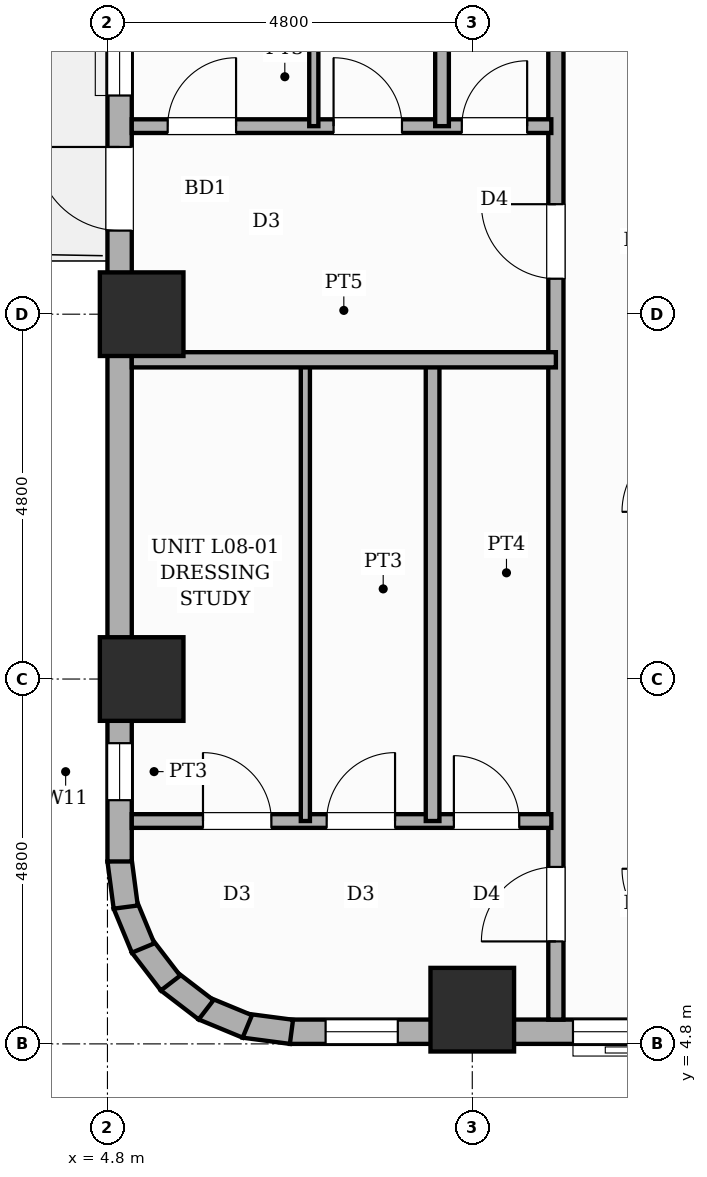
"""IFC4 building model, lengths in metres.
Left out: names, types, materials, properties, quantities, classifications, styles, units other than length and angle.
Written with IfcOpenShell. Run it as: python <this file> out.ifc"""

import sys

from ifc_helpers import new_model, si_unit, direction, frame, frame_2d, origin, origin_2d, place, context, subcontext, project, spatial, rectangle, extrude, element, fill, save


model = new_model("IFC4")
c1 = context("Model", 3, precision=1e-05, world=origin(), true_north=direction((0.0, 1.0)))
c2 = subcontext(c1, "Body", "Model", "MODEL_VIEW")
j1 = project(units=[si_unit("LENGTHUNIT", "METRE"), si_unit("PLANEANGLEUNIT", "RADIAN")], contexts=[c1])
p1 = place(None, origin())
s1 = spatial("IfcSite", under=j1, at=p1, CompositionType="ELEMENT")
p2 = place(p1, origin())
s2 = spatial("IfcBuilding", under=s1, at=p2, CompositionType="ELEMENT")
p3 = place(p2, frame((0.0, 0.0, 35.8)))
s3 = spatial("IfcBuildingStorey", under=s2, at=p3, CompositionType="ELEMENT", Elevation=35.8)
for number, where, z_axis, x_axis in (
    (1, (5.25, 9.6, 0.0), (0.0, 0.0, 1.0), (1.0, 0.0, 0.0)),
    (2, (5.25, 14.4, 0.0), (0.0, 0.0, 1.0), (1.0, 0.0, 0.0)),
    (3, (9.6, 5.25, 0.0), (0.0, 0.0, 1.0), (1.0, 0.0, 0.0)),
):
    element("IfcColumn", number, at=place(p3, frame(where, z_axis=z_axis, x_axis=x_axis)), inside=s3, PredefinedType="COLUMN", context=c2, shape_type="SweptSolid", body=[
        extrude(rectangle(XDim=1.1, YDim=1.1, at=origin_2d()), origin(), (0.0, 0.0, 1.0), 3.6),
    ])
p4 = place(p3, frame((21.6, 4.96, 0.0), z_axis=(0.0, 0.0, 1.0), x_axis=(-1.0, 0.0, 0.0)))
e4 = element("IfcWall", 4, at=p4, inside=s3, PredefinedType="STANDARD", context=c2, shape_type="SweptSolid", body=[
    extrude(rectangle(XDim=14.4, YDim=0.32, at=frame_2d((7.2, 0.0))), origin(), (0.0, 0.0, 1.0), 2.53),
])
p5 = place(p4, frame((12.98, 0.0, 0.45)))
e5 = element("IfcOpeningElement", 5, at=p5, cuts=e4, PredefinedType="OPENING", context=c2, shape_type="SweptSolid", body=[
    extrude(rectangle(XDim=0.95, YDim=1.8, at=frame_2d((0.475, 0.9))), frame((0.0, 0.17, 0.0), z_axis=(0.0, -1.0, 0.0), x_axis=(1.0, 0.0, 0.0)), (0.0, 0.0, 1.0), 0.34),
])
p6 = place(p4, frame((9.275, 0.0, 0.65)))
e6 = element("IfcOpeningElement", 6, at=p6, cuts=e4, PredefinedType="OPENING", context=c2, shape_type="SweptSolid", body=[
    extrude(rectangle(XDim=1.4, YDim=1.1, at=frame_2d((0.7, 0.55))), frame((0.0, 0.17, 0.0), z_axis=(0.0, -1.0, 0.0), x_axis=(1.0, 0.0, 0.0)), (0.0, 0.0, 1.0), 0.34),
])
p7 = place(p4, frame((4.812, 0.0, 0.65)))
e7 = element("IfcOpeningElement", 7, at=p7, cuts=e4, PredefinedType="OPENING", context=c2, shape_type="SweptSolid", body=[
    extrude(rectangle(XDim=1.4, YDim=1.1, at=frame_2d((0.7, 0.55))), frame((0.0, 0.17, 0.0), z_axis=(0.0, -1.0, 0.0), x_axis=(1.0, 0.0, 0.0)), (0.0, 0.0, 1.0), 0.34),
])
p8 = place(p4, frame((0.47, 0.0, 0.45)))
e8 = element("IfcOpeningElement", 8, at=p8, cuts=e4, PredefinedType="OPENING", context=c2, shape_type="SweptSolid", body=[
    extrude(rectangle(XDim=0.95, YDim=1.8, at=frame_2d((0.475, 0.9))), frame((0.0, 0.17, 0.0), z_axis=(0.0, -1.0, 0.0), x_axis=(1.0, 0.0, 0.0)), (0.0, 0.0, 1.0), 0.34),
])
p9 = place(p3, frame((7.221, 4.958, 0.0), z_axis=(0.0, 0.0, 1.0), x_axis=(-0.991447664465, 0.130504898859, 0.0)))
e9 = element("IfcWall", 9, at=p9, inside=s3, PredefinedType="STANDARD", context=c2, shape_type="SweptSolid", body=[
    extrude(rectangle(XDim=0.627, YDim=0.32, at=frame_2d((0.313, 0.0))), origin(), (0.0, 0.0, 1.0), 3.35),
])
p10 = place(p3, frame((6.64, 5.03, 0.0), z_axis=(0.0, 0.0, 1.0), x_axis=(-0.923836271867, 0.382787856107, 0.0)))
e10 = element("IfcWall", 10, at=p10, inside=s3, PredefinedType="STANDARD", context=c2, shape_type="SweptSolid", body=[
    extrude(rectangle(XDim=0.626, YDim=0.32, at=frame_2d((0.313, 0.0))), origin(), (0.0, 0.0, 1.0), 3.35),
])
for number, where, z_axis, x_axis in (
    (11, (6.097, 5.248, 0.0), (0.0, 0.0, 1.0), (-0.793, 0.609, 0.0)),
    (12, (5.63, 5.6, 0.0), (0.0, 0.0, 1.0), (-0.609, 0.793, 0.0)),
):
    element("IfcWall", number, at=place(p3, frame(where, z_axis=z_axis, x_axis=x_axis)), inside=s3, PredefinedType="STANDARD", context=c2, shape_type="SweptSolid", body=[
        extrude(rectangle(XDim=0.627, YDim=0.32, at=frame_2d((0.313, 0.0))), origin(), (0.0, 0.0, 1.0), 3.35),
    ])
p11 = place(p3, frame((5.269, 6.061, 0.0), z_axis=(0.0, 0.0, 1.0), x_axis=(-0.382787856107, 0.923836271867, 0.0)))
e13 = element("IfcWall", 13, at=p11, inside=s3, PredefinedType="STANDARD", context=c2, shape_type="SweptSolid", body=[
    extrude(rectangle(XDim=0.626, YDim=0.32, at=frame_2d((0.313, 0.0))), origin(), (0.0, 0.0, 1.0), 3.35),
])
p12 = place(p3, frame((5.04, 6.6, 0.0), z_axis=(0.0, 0.0, 1.0), x_axis=(-0.130504898859, 0.991447664465, 0.0)))
e14 = element("IfcWall", 14, at=p12, inside=s3, PredefinedType="STANDARD", context=c2, shape_type="SweptSolid", body=[
    extrude(rectangle(XDim=0.627, YDim=0.32, at=frame_2d((0.313, 0.0))), origin(), (0.0, 0.0, 1.0), 3.35),
])
p13 = place(p3, frame((4.96, 7.2, 0.0), z_axis=(0.0, 0.0, 1.0), x_axis=(0.0, 1.0, 0.0)))
e15 = element("IfcWall", 15, at=p13, inside=s3, PredefinedType="STANDARD", context=c2, shape_type="SweptSolid", body=[
    extrude(rectangle(XDim=38.4, YDim=0.32, at=frame_2d((19.2, 0.0))), origin(), (0.0, 0.0, 1.0), 2.53),
])
p14 = place(p13, frame((8.3, 0.0, 0.0)))
e16 = element("IfcOpeningElement", 16, at=p14, cuts=e15, PredefinedType="OPENING", context=c2, shape_type="SweptSolid", body=[
    extrude(rectangle(XDim=1.1, YDim=2.15, at=frame_2d((0.55, 1.075))), frame((0.0, 0.17, 0.0), z_axis=(0.0, -1.0, 0.0), x_axis=(1.0, 0.0, 0.0)), (0.0, 0.0, 1.0), 0.34),
])
p15 = place(p13, frame((10.077, 0.0, 0.45)))
e17 = element("IfcOpeningElement", 17, at=p15, cuts=e15, PredefinedType="OPENING", context=c2, shape_type="SweptSolid", body=[
    extrude(rectangle(XDim=0.95, YDim=1.8, at=frame_2d((0.475, 0.9))), frame((0.0, 0.17, 0.0), z_axis=(0.0, -1.0, 0.0), x_axis=(1.0, 0.0, 0.0)), (0.0, 0.0, 1.0), 0.34),
])
p16 = place(p13, frame((13.646, 0.0, 0.65)))
e18 = element("IfcOpeningElement", 18, at=p16, cuts=e15, PredefinedType="OPENING", context=c2, shape_type="SweptSolid", body=[
    extrude(rectangle(XDim=1.4, YDim=1.1, at=frame_2d((0.7, 0.55))), frame((0.0, 0.17, 0.0), z_axis=(0.0, -1.0, 0.0), x_axis=(1.0, 0.0, 0.0)), (0.0, 0.0, 1.0), 0.34),
])
p17 = place(p13, frame((0.806, 0.0, 0.45)))
e19 = element("IfcOpeningElement", 19, at=p17, cuts=e15, PredefinedType="OPENING", context=c2, shape_type="SweptSolid", body=[
    extrude(rectangle(XDim=0.75, YDim=1.8, at=frame_2d((0.375, 0.9))), frame((0.0, 0.17, 0.0), z_axis=(0.0, -1.0, 0.0), x_axis=(1.0, 0.0, 0.0)), (0.0, 0.0, 1.0), 0.34),
])
p18 = place(p13, frame((17.645, 0.0, 0.45)))
e20 = element("IfcOpeningElement", 20, at=p18, cuts=e15, PredefinedType="OPENING", context=c2, shape_type="SweptSolid", body=[
    extrude(rectangle(XDim=0.6, YDim=1.8, at=frame_2d((0.3, 0.9))), frame((0.0, 0.17, 0.0), z_axis=(0.0, -1.0, 0.0), x_axis=(1.0, 0.0, 0.0)), (0.0, 0.0, 1.0), 0.34),
])
p19 = place(p3, frame((10.7, 5.12, 0.0), z_axis=(0.0, 0.0, 1.0), x_axis=(0.0, 1.0, 0.0)))
e21 = element("IfcWall", 21, at=p19, inside=s3, PredefinedType="PARTITIONING", context=c2, shape_type="SweptSolid", body=[
    extrude(rectangle(XDim=20.63, YDim=0.2, at=frame_2d((10.315, 0.0))), origin(), (0.0, 0.0, 1.0), 3.35),
])
p20 = place(p19, frame((1.028, 0.0, 0.0)))
e22 = element("IfcOpeningElement", 22, at=p20, cuts=e21, PredefinedType="OPENING", context=c2, shape_type="SweptSolid", body=[
    extrude(rectangle(XDim=0.98, YDim=2.18, at=frame_2d((0.49, 1.09))), frame((0.0, 0.11, 0.0), z_axis=(0.0, -1.0, 0.0), x_axis=(1.0, 0.0, 0.0)), (0.0, 0.0, 1.0), 0.22),
])
p21 = place(p19, frame((9.747, 0.0, 0.0)))
e23 = element("IfcOpeningElement", 23, at=p21, cuts=e21, PredefinedType="OPENING", context=c2, shape_type="SweptSolid", body=[
    extrude(rectangle(XDim=0.98, YDim=2.18, at=frame_2d((0.49, 1.09))), frame((0.0, 0.11, 0.0), z_axis=(0.0, -1.0, 0.0), x_axis=(1.0, 0.0, 0.0)), (0.0, 0.0, 1.0), 0.22),
])
p22 = place(p19, frame((15.956, 0.0, 0.0)))
e24 = element("IfcOpeningElement", 24, at=p22, cuts=e21, PredefinedType="OPENING", context=c2, shape_type="SweptSolid", body=[
    extrude(rectangle(XDim=0.98, YDim=2.18, at=frame_2d((0.49, 1.09))), frame((0.0, 0.11, 0.0), z_axis=(0.0, -1.0, 0.0), x_axis=(1.0, 0.0, 0.0)), (0.0, 0.0, 1.0), 0.22),
])
p23 = place(p3, frame((5.12, 7.732, 0.0), z_axis=(0.0, 0.0, 1.0), x_axis=(1.0, 0.0, 0.0)))
e25 = element("IfcWall", 25, at=p23, inside=s3, PredefinedType="PLUMBINGWALL", context=c2, shape_type="SweptSolid", body=[
    extrude(rectangle(XDim=5.52, YDim=0.18, at=frame_2d((2.76, 0.0))), origin(), (0.0, 0.0, 1.0), 3.35),
])
p24 = place(p23, frame((0.937, 0.0, 0.0)))
e26 = element("IfcOpeningElement", 26, at=p24, cuts=e25, PredefinedType="OPENING", context=c2, shape_type="SweptSolid", body=[
    extrude(rectangle(XDim=0.9, YDim=2.15, at=frame_2d((0.45, 1.075))), frame((0.0, 0.1, 0.0), z_axis=(0.0, -1.0, 0.0), x_axis=(1.0, 0.0, 0.0)), (0.0, 0.0, 1.0), 0.2),
])
p25 = place(p23, frame((2.564, 0.0, 0.0)))
e27 = element("IfcOpeningElement", 27, at=p25, cuts=e25, PredefinedType="OPENING", context=c2, shape_type="SweptSolid", body=[
    extrude(rectangle(XDim=0.9, YDim=2.15, at=frame_2d((0.45, 1.075))), frame((0.0, 0.1, 0.0), z_axis=(0.0, -1.0, 0.0), x_axis=(1.0, 0.0, 0.0)), (0.0, 0.0, 1.0), 0.2),
])
p26 = place(p23, frame((4.238, 0.0, 0.0)))
e28 = element("IfcOpeningElement", 28, at=p26, cuts=e25, PredefinedType="OPENING", context=c2, shape_type="SweptSolid", body=[
    extrude(rectangle(XDim=0.86, YDim=2.1, at=frame_2d((0.43, 1.05))), frame((0.0, 0.1, 0.0), z_axis=(0.0, -1.0, 0.0), x_axis=(1.0, 0.0, 0.0)), (0.0, 0.0, 1.0), 0.2),
])
p27 = place(p3, frame((7.404, 7.732, 0.0), z_axis=(0.0, 0.0, 1.0), x_axis=(0.0, 1.0, 0.0)))
e29 = element("IfcWall", 29, at=p27, inside=s3, PredefinedType="PARTITIONING", context=c2, shape_type="SweptSolid", body=[
    extrude(rectangle(XDim=6.108, YDim=0.12, at=frame_2d((3.054, 0.0))), origin(), (0.0, 0.0, 1.0), 3.35),
])
p28 = place(p3, frame((9.078, 7.732, 0.0), z_axis=(0.0, 0.0, 1.0), x_axis=(0.0, 1.0, 0.0)))
e30 = element("IfcWall", 30, at=p28, inside=s3, PredefinedType="PLUMBINGWALL", context=c2, shape_type="SweptSolid", body=[
    extrude(rectangle(XDim=6.108, YDim=0.18, at=frame_2d((3.054, 0.0))), origin(), (0.0, 0.0, 1.0), 3.35),
])
p29 = place(p3, frame((5.12, 13.8, 0.0), z_axis=(0.0, 0.0, 1.0), x_axis=(1.0, 0.0, 0.0)))
e31 = element("IfcWall", 31, at=p29, inside=s3, PredefinedType="SOLIDWALL", context=c2, shape_type="SweptSolid", body=[
    extrude(rectangle(XDim=5.58, YDim=0.2, at=frame_2d((2.79, 0.0))), origin(), (0.0, 0.0, 1.0), 3.35),
])
p30 = place(p3, frame((5.12, 16.874, 0.0), z_axis=(0.0, 0.0, 1.0), x_axis=(1.0, 0.0, 0.0)))
e32 = element("IfcWall", 32, at=p30, inside=s3, PredefinedType="PLUMBINGWALL", context=c2, shape_type="SweptSolid", body=[
    extrude(rectangle(XDim=5.52, YDim=0.18, at=frame_2d((2.76, 0.0))), origin(), (0.0, 0.0, 1.0), 3.35),
])
p31 = place(p30, frame((0.472, 0.0, 0.0)))
e33 = element("IfcOpeningElement", 33, at=p31, cuts=e32, PredefinedType="OPENING", context=c2, shape_type="SweptSolid", body=[
    extrude(rectangle(XDim=0.9, YDim=2.15, at=frame_2d((0.45, 1.075))), frame((0.0, 0.1, 0.0), z_axis=(0.0, -1.0, 0.0), x_axis=(1.0, 0.0, 0.0)), (0.0, 0.0, 1.0), 0.2),
])
p32 = place(p30, frame((2.655, 0.0, 0.0)))
e34 = element("IfcOpeningElement", 34, at=p32, cuts=e32, PredefinedType="OPENING", context=c2, shape_type="SweptSolid", body=[
    extrude(rectangle(XDim=0.9, YDim=2.15, at=frame_2d((0.45, 1.075))), frame((0.0, 0.1, 0.0), z_axis=(0.0, -1.0, 0.0), x_axis=(1.0, 0.0, 0.0)), (0.0, 0.0, 1.0), 0.2),
])
p33 = place(p30, frame((4.342, 0.0, 0.0)))
e35 = element("IfcOpeningElement", 35, at=p33, cuts=e32, PredefinedType="OPENING", context=c2, shape_type="SweptSolid", body=[
    extrude(rectangle(XDim=0.86, YDim=2.1, at=frame_2d((0.43, 1.05))), frame((0.0, 0.1, 0.0), z_axis=(0.0, -1.0, 0.0), x_axis=(1.0, 0.0, 0.0)), (0.0, 0.0, 1.0), 0.2),
])
p34 = place(p3, frame((7.515, 16.874, 0.0), z_axis=(0.0, 0.0, 1.0), x_axis=(0.0, 1.0, 0.0)))
e36 = element("IfcWall", 36, at=p34, inside=s3, PredefinedType="PARTITIONING", context=c2, shape_type="SweptSolid", body=[
    extrude(rectangle(XDim=3.366, YDim=0.12, at=frame_2d((1.683, 0.0))), origin(), (0.0, 0.0, 1.0), 3.35),
])
p35 = place(p3, frame((9.202, 16.874, 0.0), z_axis=(0.0, 0.0, 1.0), x_axis=(0.0, 1.0, 0.0)))
e37 = element("IfcWall", 37, at=p35, inside=s3, PredefinedType="PLUMBINGWALL", context=c2, shape_type="SweptSolid", body=[
    extrude(rectangle(XDim=3.366, YDim=0.18, at=frame_2d((1.683, 0.0))), origin(), (0.0, 0.0, 1.0), 3.35),
])
p36 = place(p5, origin())
e38 = element("IfcWindow", 38, at=p36, inside=s3, PartitioningType="SINGLE_PANEL", PredefinedType="WINDOW", context=c2, shape_type="SweptSolid", body=[
    extrude(rectangle(XDim=0.95, YDim=1.8, at=frame_2d((0.475, 0.9))), frame((0.0, 0.03, 0.0), z_axis=(0.0, -1.0, 0.0), x_axis=(1.0, 0.0, 0.0)), (0.0, 0.0, 1.0), 0.06),
])
fill(e5, e38)
p37 = place(p6, origin())
e39 = element("IfcWindow", 39, at=p37, inside=s3, PartitioningType="SINGLE_PANEL", PredefinedType="WINDOW", context=c2, shape_type="SweptSolid", body=[
    extrude(rectangle(XDim=1.4, YDim=1.1, at=frame_2d((0.7, 0.55))), frame((0.0, 0.03, 0.0), z_axis=(0.0, -1.0, 0.0), x_axis=(1.0, 0.0, 0.0)), (0.0, 0.0, 1.0), 0.06),
])
fill(e6, e39)
p38 = place(p14, origin())
e40 = element("IfcDoor", 40, at=p38, inside=s3, OperationType="SINGLE_SWING_RIGHT", PredefinedType="DOOR", context=c2, shape_type="SweptSolid", body=[
    extrude(rectangle(XDim=1.1, YDim=2.15, at=frame_2d((0.55, 1.075))), frame((0.0, 0.025, 0.0), z_axis=(0.0, -1.0, 0.0), x_axis=(1.0, 0.0, 0.0)), (0.0, 0.0, 1.0), 0.05),
])
fill(e16, e40)
p39 = place(p15, origin())
e41 = element("IfcWindow", 41, at=p39, inside=s3, PartitioningType="SINGLE_PANEL", PredefinedType="WINDOW", context=c2, shape_type="SweptSolid", body=[
    extrude(rectangle(XDim=0.95, YDim=1.8, at=frame_2d((0.475, 0.9))), frame((0.0, 0.03, 0.0), z_axis=(0.0, -1.0, 0.0), x_axis=(1.0, 0.0, 0.0)), (0.0, 0.0, 1.0), 0.06),
])
fill(e17, e41)
p40 = place(p17, origin())
e42 = element("IfcWindow", 42, at=p40, inside=s3, PartitioningType="SINGLE_PANEL", PredefinedType="WINDOW", context=c2, shape_type="SweptSolid", body=[
    extrude(rectangle(XDim=0.75, YDim=1.8, at=frame_2d((0.375, 0.9))), frame((0.0, 0.03, 0.0), z_axis=(0.0, -1.0, 0.0), x_axis=(1.0, 0.0, 0.0)), (0.0, 0.0, 1.0), 0.06),
])
fill(e19, e42)
p41 = place(p20, origin())
e43 = element("IfcDoor", 43, at=p41, inside=s3, OperationType="SINGLE_SWING_LEFT", PredefinedType="DOOR", context=c2, shape_type="SweptSolid", body=[
    extrude(rectangle(XDim=0.98, YDim=2.18, at=frame_2d((0.49, 1.09))), frame((0.0, 0.025, 0.0), z_axis=(0.0, -1.0, 0.0), x_axis=(1.0, 0.0, 0.0)), (0.0, 0.0, 1.0), 0.05),
])
fill(e22, e43)
p42 = place(p24, origin())
e44 = element("IfcDoor", 44, at=p42, inside=s3, OperationType="SINGLE_SWING_LEFT", PredefinedType="DOOR", context=c2, shape_type="SweptSolid", body=[
    extrude(rectangle(XDim=0.9, YDim=2.15, at=frame_2d((0.45, 1.075))), frame((0.0, 0.025, 0.0), z_axis=(0.0, -1.0, 0.0), x_axis=(1.0, 0.0, 0.0)), (0.0, 0.0, 1.0), 0.05),
])
fill(e26, e44)
p43 = place(p25, origin())
e45 = element("IfcDoor", 45, at=p43, inside=s3, OperationType="SINGLE_SWING_RIGHT", PredefinedType="DOOR", context=c2, shape_type="SweptSolid", body=[
    extrude(rectangle(XDim=0.9, YDim=2.15, at=frame_2d((0.45, 1.075))), frame((0.0, 0.025, 0.0), z_axis=(0.0, -1.0, 0.0), x_axis=(1.0, 0.0, 0.0)), (0.0, 0.0, 1.0), 0.05),
])
fill(e27, e45)
p44 = place(p26, origin())
e46 = element("IfcDoor", 46, at=p44, inside=s3, OperationType="SINGLE_SWING_LEFT", PredefinedType="DOOR", context=c2, shape_type="SweptSolid", body=[
    extrude(rectangle(XDim=0.86, YDim=2.1, at=frame_2d((0.43, 1.05))), frame((0.0, 0.025, 0.0), z_axis=(0.0, -1.0, 0.0), x_axis=(1.0, 0.0, 0.0)), (0.0, 0.0, 1.0), 0.05),
])
fill(e28, e46)
p45 = place(p21, origin())
e47 = element("IfcDoor", 47, at=p45, inside=s3, OperationType="SINGLE_SWING_RIGHT", PredefinedType="DOOR", context=c2, shape_type="SweptSolid", body=[
    extrude(rectangle(XDim=0.98, YDim=2.18, at=frame_2d((0.49, 1.09))), frame((0.0, 0.025, 0.0), z_axis=(0.0, -1.0, 0.0), x_axis=(1.0, 0.0, 0.0)), (0.0, 0.0, 1.0), 0.05),
])
fill(e23, e47)
p46 = place(p31, origin())
e48 = element("IfcDoor", 48, at=p46, inside=s3, OperationType="SINGLE_SWING_RIGHT", PredefinedType="DOOR", context=c2, shape_type="SweptSolid", body=[
    extrude(rectangle(XDim=0.9, YDim=2.15, at=frame_2d((0.45, 1.075))), frame((0.0, 0.025, 0.0), z_axis=(0.0, -1.0, 0.0), x_axis=(1.0, 0.0, 0.0)), (0.0, 0.0, 1.0), 0.05),
])
fill(e33, e48)
p47 = place(p32, origin())
e49 = element("IfcDoor", 49, at=p47, inside=s3, OperationType="SINGLE_SWING_LEFT", PredefinedType="DOOR", context=c2, shape_type="SweptSolid", body=[
    extrude(rectangle(XDim=0.9, YDim=2.15, at=frame_2d((0.45, 1.075))), frame((0.0, 0.025, 0.0), z_axis=(0.0, -1.0, 0.0), x_axis=(1.0, 0.0, 0.0)), (0.0, 0.0, 1.0), 0.05),
])
fill(e34, e49)
p48 = place(p33, origin())
e50 = element("IfcDoor", 50, at=p48, inside=s3, OperationType="SINGLE_SWING_RIGHT", PredefinedType="DOOR", context=c2, shape_type="SweptSolid", body=[
    extrude(rectangle(XDim=0.86, YDim=2.1, at=frame_2d((0.43, 1.05))), frame((0.0, 0.025, 0.0), z_axis=(0.0, -1.0, 0.0), x_axis=(1.0, 0.0, 0.0)), (0.0, 0.0, 1.0), 0.05),
])
fill(e35, e50)
save(model, sys.argv[1])
